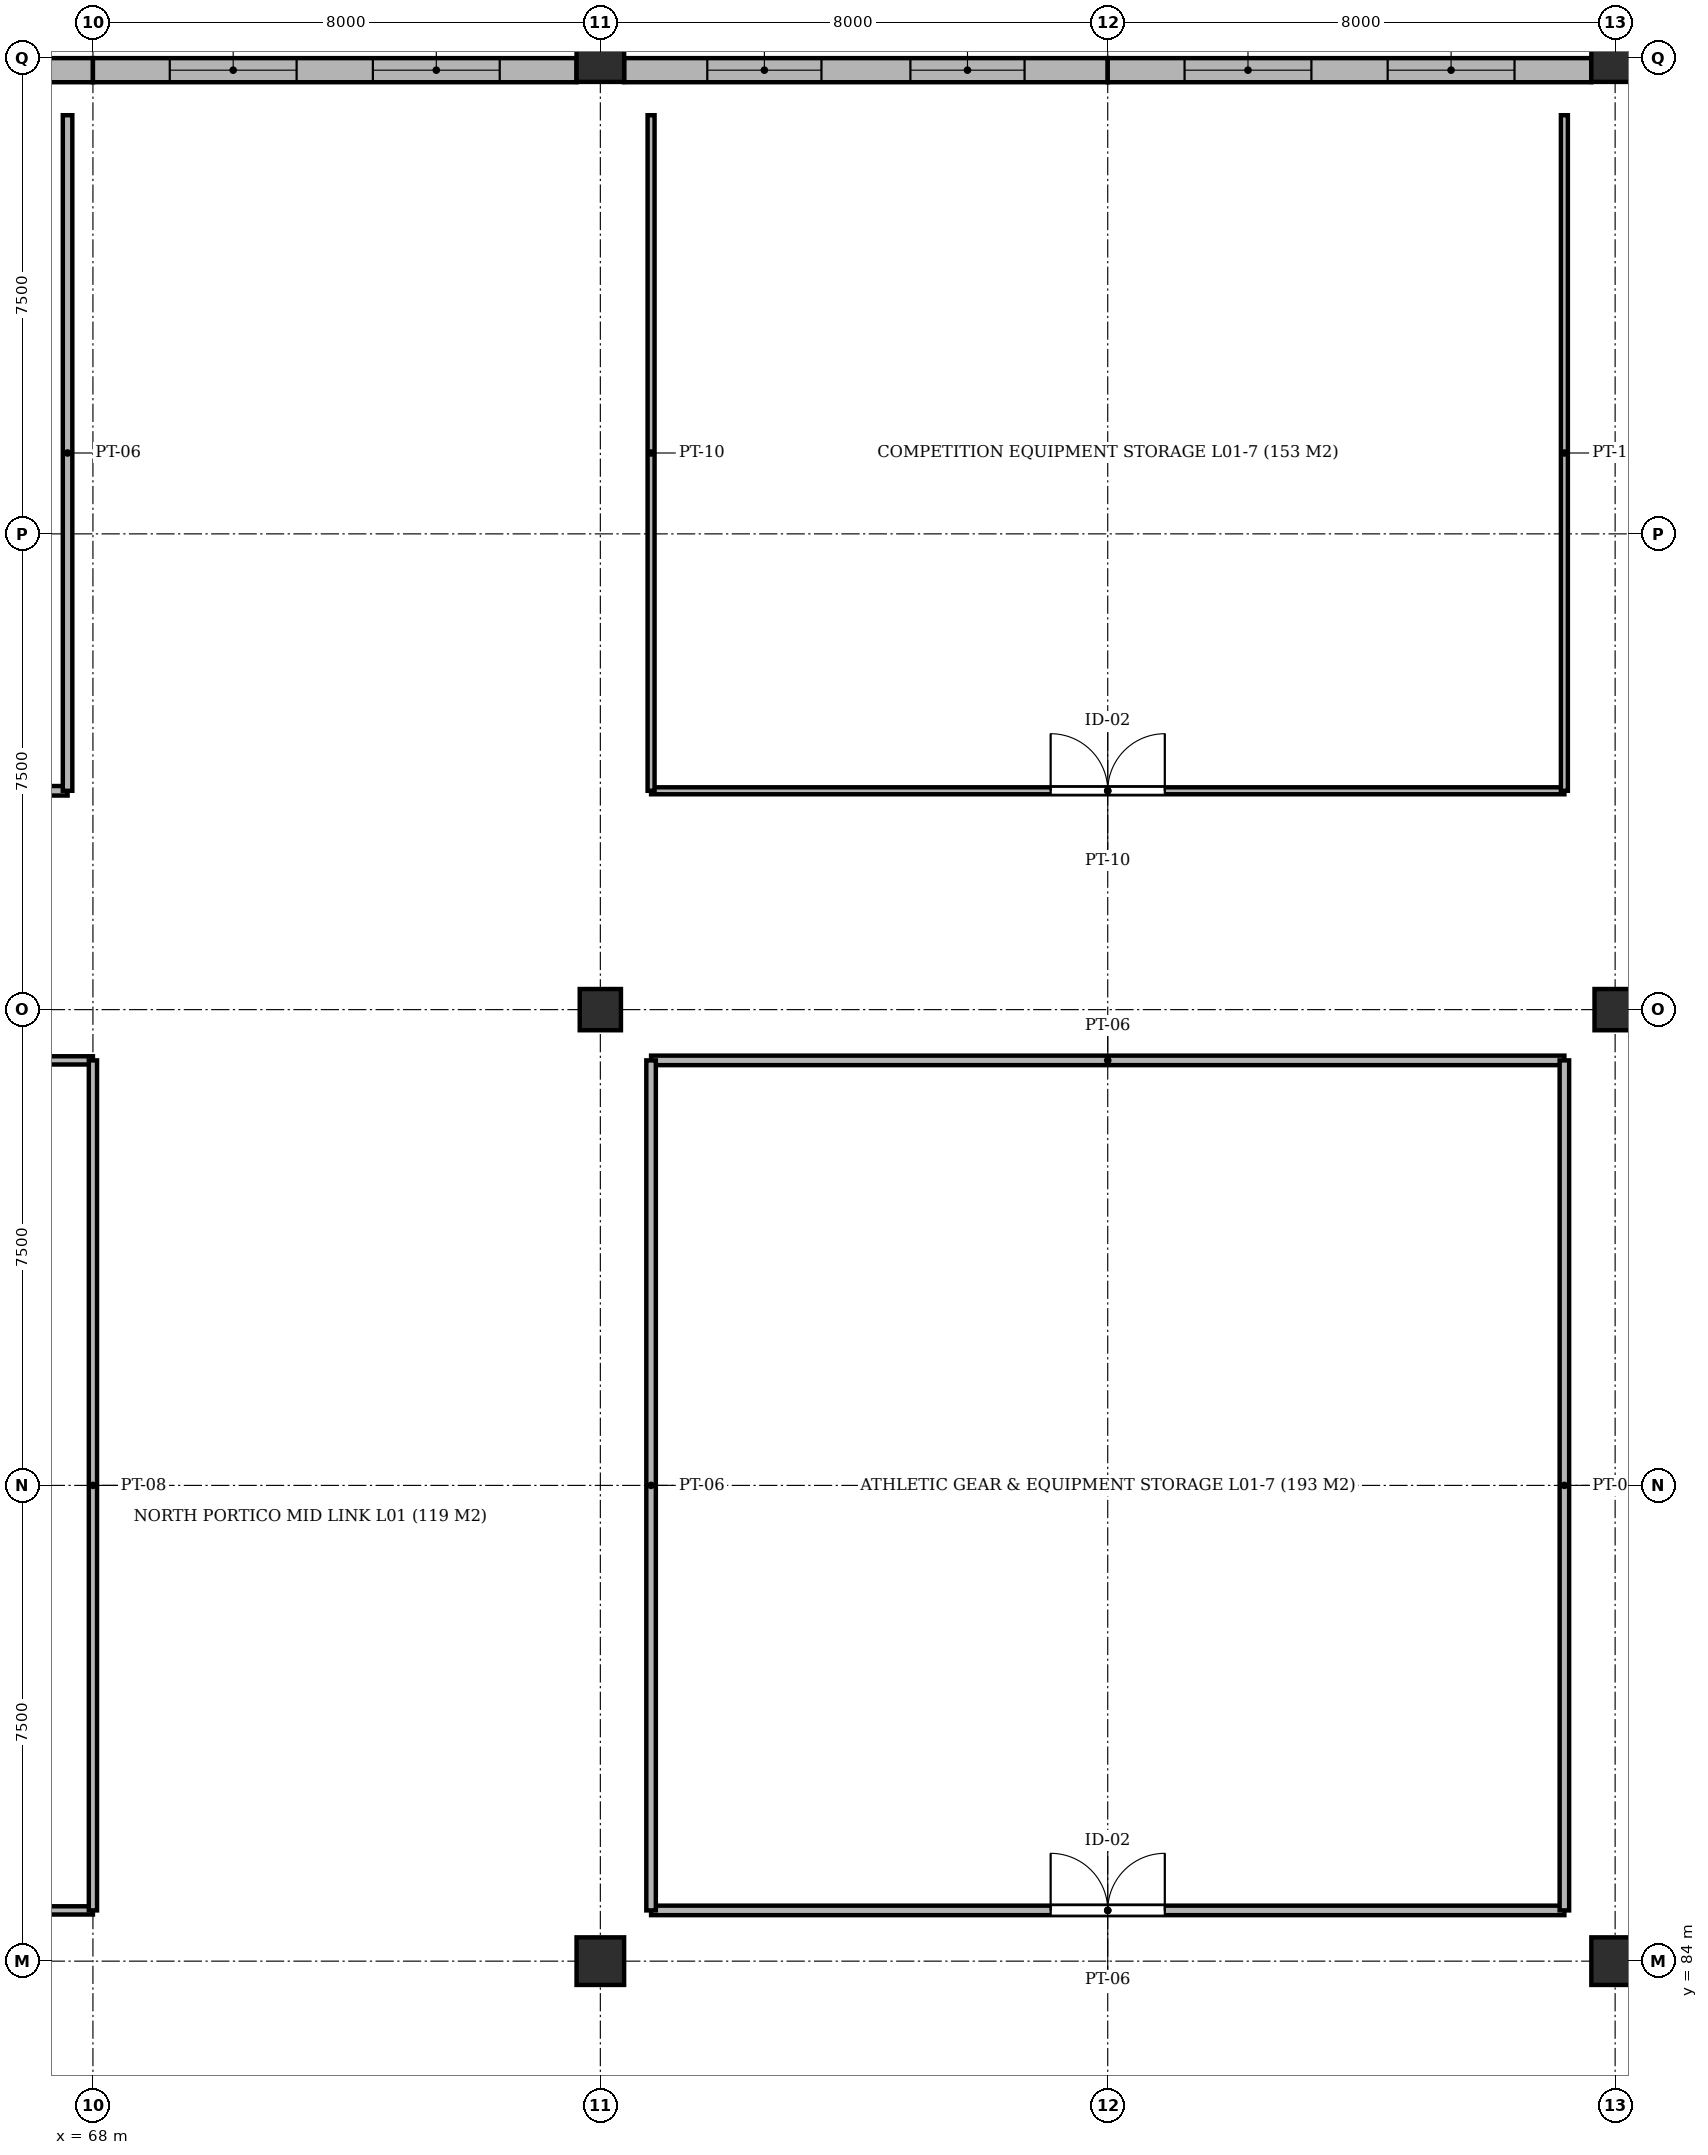
"""IFC4 building model, lengths in metres.
Left out: names, types, materials, properties, quantities, classifications, styles, units other than length and angle.
Written with IfcOpenShell. Run it as: python <this file> out.ifc"""

import sys

from ifc_helpers import new_model, si_unit, direction, frame, frame_2d, origin, origin_2d, place, context, subcontext, project, spatial, rectangle, extrude, element, fill, save


model = new_model("IFC4")
c1 = context("Model", 3, precision=1e-05, world=origin(), true_north=direction((0.0, 1.0)))
c2 = subcontext(c1, "Body", "Model", "MODEL_VIEW")
j1 = project(units=[si_unit("LENGTHUNIT", "METRE"), si_unit("PLANEANGLEUNIT", "RADIAN")], contexts=[c1])
p1 = place(None, origin())
s1 = spatial("IfcSite", under=j1, at=p1, CompositionType="ELEMENT")
p2 = place(p1, origin())
s2 = spatial("IfcBuilding", under=s1, at=p2, CompositionType="ELEMENT")
p3 = place(p2, frame((0.0, 0.0, 4.6)))
s3 = spatial("IfcBuildingStorey", under=s2, at=p3, CompositionType="ELEMENT", Elevation=4.6)
p4 = place(p3, frame((76.0, 84.0, -0.3), z_axis=(0.0, 0.0, 1.0), x_axis=(1.0, 0.0, 0.0)))
e1 = element("IfcColumn", 1, at=p4, inside=s3, PredefinedType="COLUMN", context=c2, shape_type="SweptSolid", body=[
    extrude(rectangle(XDim=0.75, YDim=0.75, at=origin_2d()), origin(), (0.0, 0.0, 1.0), 4.65),
])
p5 = place(p3, frame((76.0, 99.0, -0.3), z_axis=(0.0, 0.0, 1.0), x_axis=(1.0, 0.0, 0.0)))
e2 = element("IfcColumn", 2, at=p5, inside=s3, PredefinedType="COLUMN", context=c2, shape_type="SweptSolid", body=[
    extrude(rectangle(XDim=0.65, YDim=0.65, at=origin_2d()), origin(), (0.0, 0.0, 1.0), 4.65),
])
for number, where, z_axis, x_axis in (
    (3, (76.0, 114.0, -0.3), (0.0, 0.0, 1.0), (1.0, 0.0, 0.0)),
    (4, (92.0, 84.0, -0.3), (0.0, 0.0, 1.0), (1.0, 0.0, 0.0)),
):
    element("IfcColumn", number, at=place(p3, frame(where, z_axis=z_axis, x_axis=x_axis)), inside=s3, PredefinedType="COLUMN", context=c2, shape_type="SweptSolid", body=[
        extrude(rectangle(XDim=0.75, YDim=0.75, at=origin_2d()), origin(), (0.0, 0.0, 1.0), 4.65),
    ])
p6 = place(p3, frame((92.0, 99.0, -0.3), z_axis=(0.0, 0.0, 1.0), x_axis=(1.0, 0.0, 0.0)))
e5 = element("IfcColumn", 5, at=p6, inside=s3, PredefinedType="COLUMN", context=c2, shape_type="SweptSolid", body=[
    extrude(rectangle(XDim=0.65, YDim=0.65, at=origin_2d()), origin(), (0.0, 0.0, 1.0), 4.65),
])
p7 = place(p3, frame((92.0, 114.0, -0.3), z_axis=(0.0, 0.0, 1.0), x_axis=(1.0, 0.0, 0.0)))
e6 = element("IfcColumn", 6, at=p7, inside=s3, PredefinedType="COLUMN", context=c2, shape_type="SweptSolid", body=[
    extrude(rectangle(XDim=0.75, YDim=0.75, at=origin_2d()), origin(), (0.0, 0.0, 1.0), 4.65),
])
p8 = place(p3, frame((68.0, 113.81, 0.0), z_axis=(0.0, 0.0, 1.0), x_axis=(-1.0, 0.0, 0.0)))
e7 = element("IfcWall", 7, at=p8, inside=s3, PredefinedType="SOLIDWALL", context=c2, shape_type="SweptSolid", body=[
    extrude(rectangle(XDim=7.625, YDim=0.38, at=frame_2d((3.812, 0.0))), origin(), (0.0, 0.0, 1.0), 3.65),
])
p9 = place(p8, frame((4.414, 0.0, 0.92)))
e8 = element("IfcOpeningElement", 8, at=p9, cuts=e7, PredefinedType="OPENING", context=c2, shape_type="SweptSolid", body=[
    extrude(rectangle(XDim=2.0, YDim=2.3, at=frame_2d((1.0, 1.15))), frame((0.0, 0.202, 0.0), z_axis=(0.0, -1.0, 0.0), x_axis=(1.0, 0.0, 0.0)), (0.0, 0.0, 1.0), 0.404),
])
p10 = place(p8, frame((1.211, 0.0, 0.92)))
e9 = element("IfcOpeningElement", 9, at=p10, cuts=e7, PredefinedType="OPENING", context=c2, shape_type="SweptSolid", body=[
    extrude(rectangle(XDim=2.0, YDim=2.3, at=frame_2d((1.0, 1.15))), frame((0.0, 0.202, 0.0), z_axis=(0.0, -1.0, 0.0), x_axis=(1.0, 0.0, 0.0)), (0.0, 0.0, 1.0), 0.404),
])
p11 = place(p3, frame((75.625, 113.81, 0.0), z_axis=(0.0, 0.0, 1.0), x_axis=(-1.0, 0.0, 0.0)))
e10 = element("IfcWall", 10, at=p11, inside=s3, PredefinedType="SOLIDWALL", context=c2, shape_type="SweptSolid", body=[
    extrude(rectangle(XDim=7.625, YDim=0.38, at=frame_2d((3.812, 0.0))), origin(), (0.0, 0.0, 1.0), 3.65),
])
p12 = place(p11, frame((4.414, 0.0, 0.92)))
e11 = element("IfcOpeningElement", 11, at=p12, cuts=e10, PredefinedType="OPENING", context=c2, shape_type="SweptSolid", body=[
    extrude(rectangle(XDim=2.0, YDim=2.3, at=frame_2d((1.0, 1.15))), frame((0.0, 0.202, 0.0), z_axis=(0.0, -1.0, 0.0), x_axis=(1.0, 0.0, 0.0)), (0.0, 0.0, 1.0), 0.404),
])
p13 = place(p11, frame((1.211, 0.0, 0.92)))
e12 = element("IfcOpeningElement", 12, at=p13, cuts=e10, PredefinedType="OPENING", context=c2, shape_type="SweptSolid", body=[
    extrude(rectangle(XDim=2.0, YDim=2.3, at=frame_2d((1.0, 1.15))), frame((0.0, 0.202, 0.0), z_axis=(0.0, -1.0, 0.0), x_axis=(1.0, 0.0, 0.0)), (0.0, 0.0, 1.0), 0.404),
])
p14 = place(p3, frame((84.0, 113.81, 0.0), z_axis=(0.0, 0.0, 1.0), x_axis=(-1.0, 0.0, 0.0)))
e13 = element("IfcWall", 13, at=p14, inside=s3, PredefinedType="SOLIDWALL", context=c2, shape_type="SweptSolid", body=[
    extrude(rectangle(XDim=7.625, YDim=0.38, at=frame_2d((3.812, 0.0))), origin(), (0.0, 0.0, 1.0), 3.65),
])
p15 = place(p14, frame((4.514, 0.0, 0.92)))
e14 = element("IfcOpeningElement", 14, at=p15, cuts=e13, PredefinedType="OPENING", context=c2, shape_type="SweptSolid", body=[
    extrude(rectangle(XDim=1.8, YDim=2.3, at=frame_2d((0.9, 1.15))), frame((0.0, 0.202, 0.0), z_axis=(0.0, -1.0, 0.0), x_axis=(1.0, 0.0, 0.0)), (0.0, 0.0, 1.0), 0.404),
])
p16 = place(p14, frame((1.311, 0.0, 0.92)))
e15 = element("IfcOpeningElement", 15, at=p16, cuts=e13, PredefinedType="OPENING", context=c2, shape_type="SweptSolid", body=[
    extrude(rectangle(XDim=1.8, YDim=2.3, at=frame_2d((0.9, 1.15))), frame((0.0, 0.202, 0.0), z_axis=(0.0, -1.0, 0.0), x_axis=(1.0, 0.0, 0.0)), (0.0, 0.0, 1.0), 0.404),
])
p17 = place(p3, frame((91.625, 113.81, 0.0), z_axis=(0.0, 0.0, 1.0), x_axis=(-1.0, 0.0, 0.0)))
e16 = element("IfcWall", 16, at=p17, inside=s3, PredefinedType="SOLIDWALL", context=c2, shape_type="SweptSolid", body=[
    extrude(rectangle(XDim=7.625, YDim=0.38, at=frame_2d((3.812, 0.0))), origin(), (0.0, 0.0, 1.0), 3.65),
])
p18 = place(p17, frame((4.414, 0.0, 0.92)))
e17 = element("IfcOpeningElement", 17, at=p18, cuts=e16, PredefinedType="OPENING", context=c2, shape_type="SweptSolid", body=[
    extrude(rectangle(XDim=2.0, YDim=2.3, at=frame_2d((1.0, 1.15))), frame((0.0, 0.202, 0.0), z_axis=(0.0, -1.0, 0.0), x_axis=(1.0, 0.0, 0.0)), (0.0, 0.0, 1.0), 0.404),
])
p19 = place(p17, frame((1.211, 0.0, 0.92)))
e18 = element("IfcOpeningElement", 18, at=p19, cuts=e16, PredefinedType="OPENING", context=c2, shape_type="SweptSolid", body=[
    extrude(rectangle(XDim=2.0, YDim=2.3, at=frame_2d((1.0, 1.15))), frame((0.0, 0.202, 0.0), z_axis=(0.0, -1.0, 0.0), x_axis=(1.0, 0.0, 0.0)), (0.0, 0.0, 1.0), 0.404),
])
p20 = place(p3, frame((60.8, 84.8, 0.0), z_axis=(0.0, 0.0, 1.0), x_axis=(1.0, 0.0, 0.0)))
e19 = element("IfcWall", 19, at=p20, inside=s3, PredefinedType="PARTITIONING", context=c2, shape_type="SweptSolid", body=[
    extrude(rectangle(XDim=7.2, YDim=0.13, at=frame_2d((3.6, 0.0))), origin(), (0.0, 0.0, 1.0), 4.08),
])
p21 = place(p20, frame((3.1, 0.0, 0.0)))
e20 = element("IfcOpeningElement", 20, at=p21, cuts=e19, PredefinedType="OPENING", context=c2, shape_type="SweptSolid", body=[
    extrude(rectangle(XDim=1.0, YDim=2.15, at=frame_2d((0.5, 1.075))), frame((0.0, 0.077, 0.0), z_axis=(0.0, -1.0, 0.0), x_axis=(1.0, 0.0, 0.0)), (0.0, 0.0, 1.0), 0.154),
])
p22 = place(p3, frame((60.8, 98.2, 0.0), z_axis=(0.0, 0.0, 1.0), x_axis=(1.0, 0.0, 0.0)))
e21 = element("IfcWall", 21, at=p22, inside=s3, PredefinedType="PARTITIONING", context=c2, shape_type="SweptSolid", body=[
    extrude(rectangle(XDim=7.2, YDim=0.13, at=frame_2d((3.6, 0.0))), origin(), (0.0, 0.0, 1.0), 4.08),
])
p23 = place(p3, frame((68.0, 84.8, 0.0), z_axis=(0.0, 0.0, 1.0), x_axis=(0.0, 1.0, 0.0)))
e22 = element("IfcWall", 22, at=p23, inside=s3, PredefinedType="PARTITIONING", context=c2, shape_type="SweptSolid", body=[
    extrude(rectangle(XDim=13.4, YDim=0.13, at=frame_2d((6.7, 0.0))), origin(), (0.0, 0.0, 1.0), 4.08),
])
p24 = place(p3, frame((76.8, 84.8, 0.0), z_axis=(0.0, 0.0, 1.0), x_axis=(1.0, 0.0, 0.0)))
e23 = element("IfcWall", 23, at=p24, inside=s3, PredefinedType="PARTITIONING", context=c2, shape_type="SweptSolid", body=[
    extrude(rectangle(XDim=14.4, YDim=0.15, at=frame_2d((7.2, 0.0))), origin(), (0.0, 0.0, 1.0), 4.08),
])
p25 = place(p24, frame((6.3, 0.0, 0.0)))
e24 = element("IfcOpeningElement", 24, at=p25, cuts=e23, PredefinedType="OPENING", context=c2, shape_type="SweptSolid", body=[
    extrude(rectangle(XDim=1.8, YDim=2.25, at=frame_2d((0.9, 1.125))), frame((0.0, 0.087, 0.0), z_axis=(0.0, -1.0, 0.0), x_axis=(1.0, 0.0, 0.0)), (0.0, 0.0, 1.0), 0.174),
])
p26 = place(p3, frame((76.8, 98.2, 0.0), z_axis=(0.0, 0.0, 1.0), x_axis=(1.0, 0.0, 0.0)))
e25 = element("IfcWall", 25, at=p26, inside=s3, PredefinedType="PARTITIONING", context=c2, shape_type="SweptSolid", body=[
    extrude(rectangle(XDim=14.4, YDim=0.15, at=frame_2d((7.2, 0.0))), origin(), (0.0, 0.0, 1.0), 4.08),
])
for number, where, z_axis, x_axis in (
    (26, (76.8, 84.8, 0.0), (0.0, 0.0, 1.0), (0.0, 1.0, 0.0)),
    (27, (91.2, 84.8, 0.0), (0.0, 0.0, 1.0), (0.0, 1.0, 0.0)),
):
    element("IfcWall", number, at=place(p3, frame(where, z_axis=z_axis, x_axis=x_axis)), inside=s3, PredefinedType="PARTITIONING", context=c2, shape_type="SweptSolid", body=[
        extrude(rectangle(XDim=13.4, YDim=0.15, at=frame_2d((6.7, 0.0))), origin(), (0.0, 0.0, 1.0), 4.08),
    ])
p27 = place(p3, frame((60.8, 102.45, 0.0), z_axis=(0.0, 0.0, 1.0), x_axis=(1.0, 0.0, 0.0)))
e28 = element("IfcWall", 28, at=p27, inside=s3, PredefinedType="PARTITIONING", context=c2, shape_type="SweptSolid", body=[
    extrude(rectangle(XDim=6.8, YDim=0.15, at=frame_2d((3.4, 0.0))), origin(), (0.0, 0.0, 1.0), 4.08),
])
p28 = place(p27, frame((2.9, 0.0, 0.0)))
e29 = element("IfcOpeningElement", 29, at=p28, cuts=e28, PredefinedType="OPENING", context=c2, shape_type="SweptSolid", body=[
    extrude(rectangle(XDim=1.0, YDim=2.15, at=frame_2d((0.5, 1.075))), frame((0.0, 0.087, 0.0), z_axis=(0.0, -1.0, 0.0), x_axis=(1.0, 0.0, 0.0)), (0.0, 0.0, 1.0), 0.174),
])
p29 = place(p3, frame((67.6, 102.45, 0.0), z_axis=(0.0, 0.0, 1.0), x_axis=(0.0, 1.0, 0.0)))
e30 = element("IfcWall", 30, at=p29, inside=s3, PredefinedType="PARTITIONING", context=c2, shape_type="SweptSolid", body=[
    extrude(rectangle(XDim=10.65, YDim=0.15, at=frame_2d((5.325, 0.0))), origin(), (0.0, 0.0, 1.0), 4.08),
])
p30 = place(p3, frame((76.8, 102.45, 0.0), z_axis=(0.0, 0.0, 1.0), x_axis=(1.0, 0.0, 0.0)))
e31 = element("IfcWall", 31, at=p30, inside=s3, PredefinedType="PARTITIONING", context=c2, shape_type="SweptSolid", body=[
    extrude(rectangle(XDim=14.4, YDim=0.11, at=frame_2d((7.2, 0.0))), origin(), (0.0, 0.0, 1.0), 4.08),
])
p31 = place(p30, frame((6.3, 0.0, 0.0)))
e32 = element("IfcOpeningElement", 32, at=p31, cuts=e31, PredefinedType="OPENING", context=c2, shape_type="SweptSolid", body=[
    extrude(rectangle(XDim=1.8, YDim=2.25, at=frame_2d((0.9, 1.125))), frame((0.0, 0.067, 0.0), z_axis=(0.0, -1.0, 0.0), x_axis=(1.0, 0.0, 0.0)), (0.0, 0.0, 1.0), 0.134),
])
for number, where, z_axis, x_axis in (
    (33, (76.8, 102.45, 0.0), (0.0, 0.0, 1.0), (0.0, 1.0, 0.0)),
    (34, (91.2, 102.45, 0.0), (0.0, 0.0, 1.0), (0.0, 1.0, 0.0)),
):
    element("IfcWall", number, at=place(p3, frame(where, z_axis=z_axis, x_axis=x_axis)), inside=s3, PredefinedType="PARTITIONING", context=c2, shape_type="SweptSolid", body=[
        extrude(rectangle(XDim=10.65, YDim=0.11, at=frame_2d((5.325, 0.0))), origin(), (0.0, 0.0, 1.0), 4.08),
    ])
p32 = place(p12, origin())
e35 = element("IfcWindow", 35, at=p32, inside=s3, PartitioningType="SINGLE_PANEL", PredefinedType="WINDOW", context=c2, shape_type="SweptSolid", body=[
    extrude(rectangle(XDim=2.0, YDim=2.3, at=frame_2d((1.0, 1.15))), frame((0.0, 0.03, 0.0), z_axis=(0.0, -1.0, 0.0), x_axis=(1.0, 0.0, 0.0)), (0.0, 0.0, 1.0), 0.06),
])
fill(e11, e35)
p33 = place(p13, origin())
e36 = element("IfcWindow", 36, at=p33, inside=s3, PartitioningType="SINGLE_PANEL", PredefinedType="WINDOW", context=c2, shape_type="SweptSolid", body=[
    extrude(rectangle(XDim=2.0, YDim=2.3, at=frame_2d((1.0, 1.15))), frame((0.0, 0.03, 0.0), z_axis=(0.0, -1.0, 0.0), x_axis=(1.0, 0.0, 0.0)), (0.0, 0.0, 1.0), 0.06),
])
fill(e12, e36)
p34 = place(p15, origin())
e37 = element("IfcWindow", 37, at=p34, inside=s3, PartitioningType="SINGLE_PANEL", PredefinedType="WINDOW", context=c2, shape_type="SweptSolid", body=[
    extrude(rectangle(XDim=1.8, YDim=2.3, at=frame_2d((0.9, 1.15))), frame((0.0, 0.03, 0.0), z_axis=(0.0, -1.0, 0.0), x_axis=(1.0, 0.0, 0.0)), (0.0, 0.0, 1.0), 0.06),
])
fill(e14, e37)
p35 = place(p16, origin())
e38 = element("IfcWindow", 38, at=p35, inside=s3, PartitioningType="SINGLE_PANEL", PredefinedType="WINDOW", context=c2, shape_type="SweptSolid", body=[
    extrude(rectangle(XDim=1.8, YDim=2.3, at=frame_2d((0.9, 1.15))), frame((0.0, 0.03, 0.0), z_axis=(0.0, -1.0, 0.0), x_axis=(1.0, 0.0, 0.0)), (0.0, 0.0, 1.0), 0.06),
])
fill(e15, e38)
p36 = place(p18, origin())
e39 = element("IfcWindow", 39, at=p36, inside=s3, PartitioningType="SINGLE_PANEL", PredefinedType="WINDOW", context=c2, shape_type="SweptSolid", body=[
    extrude(rectangle(XDim=2.0, YDim=2.3, at=frame_2d((1.0, 1.15))), frame((0.0, 0.03, 0.0), z_axis=(0.0, -1.0, 0.0), x_axis=(1.0, 0.0, 0.0)), (0.0, 0.0, 1.0), 0.06),
])
fill(e17, e39)
p37 = place(p19, origin())
e40 = element("IfcWindow", 40, at=p37, inside=s3, PartitioningType="SINGLE_PANEL", PredefinedType="WINDOW", context=c2, shape_type="SweptSolid", body=[
    extrude(rectangle(XDim=2.0, YDim=2.3, at=frame_2d((1.0, 1.15))), frame((0.0, 0.03, 0.0), z_axis=(0.0, -1.0, 0.0), x_axis=(1.0, 0.0, 0.0)), (0.0, 0.0, 1.0), 0.06),
])
fill(e18, e40)
p38 = place(p25, origin())
e41 = element("IfcDoor", 41, at=p38, inside=s3, OperationType="DOUBLE_DOOR_SINGLE_SWING", PredefinedType="DOOR", context=c2, shape_type="SweptSolid", body=[
    extrude(rectangle(XDim=1.8, YDim=2.25, at=frame_2d((0.9, 1.125))), frame((0.0, 0.025, 0.0), z_axis=(0.0, -1.0, 0.0), x_axis=(1.0, 0.0, 0.0)), (0.0, 0.0, 1.0), 0.05),
])
fill(e24, e41)
p39 = place(p31, origin())
e42 = element("IfcDoor", 42, at=p39, inside=s3, OperationType="DOUBLE_DOOR_SINGLE_SWING", PredefinedType="DOOR", context=c2, shape_type="SweptSolid", body=[
    extrude(rectangle(XDim=1.8, YDim=2.25, at=frame_2d((0.9, 1.125))), frame((0.0, 0.025, 0.0), z_axis=(0.0, -1.0, 0.0), x_axis=(1.0, 0.0, 0.0)), (0.0, 0.0, 1.0), 0.05),
])
fill(e32, e42)
save(model, sys.argv[1])
